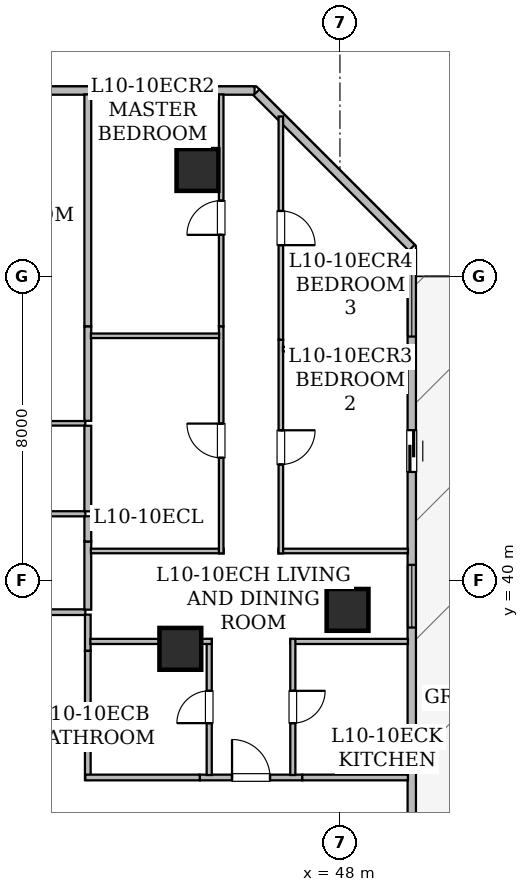
"""IFC4 building model, lengths in metres.
Left out: names, types, materials, properties, quantities, classifications, styles, units other than length and angle.
Written with IfcOpenShell. Run it as: python <this file> out.ifc"""

import sys

from ifc_helpers import new_model, si_unit, direction, frame, frame_2d, origin, origin_2d, place, context, subcontext, project, spatial, rectangle, hollow_rectangle, extrude, element, fill, save


model = new_model("IFC4")
c1 = context("Model", 3, precision=1e-05, world=origin(), true_north=direction((0.0, 1.0)))
c2 = subcontext(c1, "Body", "Model", "MODEL_VIEW")
j1 = project(units=[si_unit("LENGTHUNIT", "METRE"), si_unit("PLANEANGLEUNIT", "RADIAN")], contexts=[c1])
p1 = place(None, origin())
s1 = spatial("IfcSite", under=j1, at=p1, CompositionType="ELEMENT")
p2 = place(p1, origin())
s2 = spatial("IfcBuilding", under=s1, at=p2, CompositionType="ELEMENT")
p3 = place(p2, frame((0.0, 0.0, 44.25)))
s3 = spatial("IfcBuildingStorey", under=s2, at=p3, CompositionType="ELEMENT", Elevation=44.25)
for number, where, z_axis, x_axis in (
    (1, (44.25, 50.8, 0.0), (0.0, 0.0, 1.0), (1.0, 0.0, 0.0)),
    (2, (48.2, 39.225, 0.0), (0.0, 0.0, 1.0), (1.0, 0.0, 0.0)),
    (3, (43.8, 38.2, 0.0), (0.0, 0.0, 1.0), (1.0, 0.0, 0.0)),
):
    element("IfcColumn", number, at=place(p3, frame(where, z_axis=z_axis, x_axis=x_axis)), inside=s3, PredefinedType="COLUMN", context=c2, shape_type="SweptSolid", body=[
        extrude(hollow_rectangle(XDim=1.1, YDim=1.1, WallThickness=0.055, at=origin_2d()), origin(), (0.0, 0.0, 1.0), 3.65),
    ])
p4 = place(p3, frame((8.315, 52.89, 0.0), z_axis=(0.0, 0.0, 1.0), x_axis=(1.0, 0.0, 0.0)))
e4 = element("IfcWall", 4, at=p4, inside=s3, PredefinedType="STANDARD", context=c2, shape_type="SweptSolid", body=[
    extrude(rectangle(XDim=37.439, YDim=0.22, at=frame_2d((18.719, 0.0))), origin(), (0.0, 0.0, 1.0), 3.43),
])
p5 = place(p4, frame((3.164, 0.0, 0.85)))
e5 = element("IfcOpeningElement", 5, at=p5, cuts=e4, PredefinedType="OPENING", context=c2, shape_type="SweptSolid", body=[
    extrude(rectangle(XDim=1.65, YDim=1.55, at=frame_2d((0.825, 0.775))), frame((0.0, 0.12, 0.0), z_axis=(0.0, -1.0, 0.0), x_axis=(1.0, 0.0, 0.0)), (0.0, 0.0, 1.0), 0.24),
])
p6 = place(p4, frame((15.94, 0.0, 0.85)))
e6 = element("IfcOpeningElement", 6, at=p6, cuts=e4, PredefinedType="OPENING", context=c2, shape_type="SweptSolid", body=[
    extrude(rectangle(XDim=1.65, YDim=1.55, at=frame_2d((0.825, 0.775))), frame((0.0, 0.12, 0.0), z_axis=(0.0, -1.0, 0.0), x_axis=(1.0, 0.0, 0.0)), (0.0, 0.0, 1.0), 0.24),
])
p7 = place(p4, frame((13.619, 0.0, 0.8)))
e7 = element("IfcOpeningElement", 7, at=p7, cuts=e4, PredefinedType="OPENING", context=c2, shape_type="SweptSolid", body=[
    extrude(rectangle(XDim=1.2, YDim=1.5, at=frame_2d((0.6, 0.75))), frame((0.0, 0.12, 0.0), z_axis=(0.0, -1.0, 0.0), x_axis=(1.0, 0.0, 0.0)), (0.0, 0.0, 1.0), 0.24),
])
p8 = place(p4, frame((8.999, 0.0, 0.85)))
e8 = element("IfcOpeningElement", 8, at=p8, cuts=e4, PredefinedType="OPENING", context=c2, shape_type="SweptSolid", body=[
    extrude(rectangle(XDim=1.65, YDim=1.55, at=frame_2d((0.825, 0.775))), frame((0.0, 0.12, 0.0), z_axis=(0.0, -1.0, 0.0), x_axis=(1.0, 0.0, 0.0)), (0.0, 0.0, 1.0), 0.24),
])
p9 = place(p4, frame((25.185, 0.0, 0.8)))
e9 = element("IfcOpeningElement", 9, at=p9, cuts=e4, PredefinedType="OPENING", context=c2, shape_type="SweptSolid", body=[
    extrude(rectangle(XDim=1.2, YDim=1.5, at=frame_2d((0.6, 0.75))), frame((0.0, 0.12, 0.0), z_axis=(0.0, -1.0, 0.0), x_axis=(1.0, 0.0, 0.0)), (0.0, 0.0, 1.0), 0.24),
])
p10 = place(p4, frame((20.935, 0.0, 0.85)))
e10 = element("IfcOpeningElement", 10, at=p10, cuts=e4, PredefinedType="OPENING", context=c2, shape_type="SweptSolid", body=[
    extrude(rectangle(XDim=1.65, YDim=1.55, at=frame_2d((0.825, 0.775))), frame((0.0, 0.12, 0.0), z_axis=(0.0, -1.0, 0.0), x_axis=(1.0, 0.0, 0.0)), (0.0, 0.0, 1.0), 0.24),
])
p11 = place(p4, frame((28.985, 0.0, 0.85)))
e11 = element("IfcOpeningElement", 11, at=p11, cuts=e4, PredefinedType="OPENING", context=c2, shape_type="SweptSolid", body=[
    extrude(rectangle(XDim=1.65, YDim=1.55, at=frame_2d((0.825, 0.775))), frame((0.0, 0.12, 0.0), z_axis=(0.0, -1.0, 0.0), x_axis=(1.0, 0.0, 0.0)), (0.0, 0.0, 1.0), 0.24),
])
p12 = place(p4, frame((33.98, 0.0, 0.85)))
e12 = element("IfcOpeningElement", 12, at=p12, cuts=e4, PredefinedType="OPENING", context=c2, shape_type="SweptSolid", body=[
    extrude(rectangle(XDim=1.65, YDim=1.55, at=frame_2d((0.825, 0.775))), frame((0.0, 0.12, 0.0), z_axis=(0.0, -1.0, 0.0), x_axis=(1.0, 0.0, 0.0)), (0.0, 0.0, 1.0), 0.24),
])
p13 = place(p3, frame((45.802, 52.842, 0.0), z_axis=(0.0, 0.0, 1.0), x_axis=(0.707085666273, -0.70712789547, 0.0)))
e13 = element("IfcWall", 13, at=p13, inside=s3, PredefinedType="STANDARD", context=c2, shape_type="SweptSolid", body=[
    extrude(rectangle(XDim=5.781, YDim=0.22, at=frame_2d((2.891, 0.0))), origin(), (0.0, 0.0, 1.0), 3.43),
])
p14 = place(p3, frame((49.89, 48.683, 0.0), z_axis=(0.0, 0.0, 1.0), x_axis=(0.0, -1.0, 0.0)))
e14 = element("IfcWall", 14, at=p14, inside=s3, PredefinedType="STANDARD", context=c2, shape_type="SweptSolid", body=[
    extrude(rectangle(XDim=17.446, YDim=0.22, at=frame_2d((8.723, 0.0))), origin(), (0.0, 0.0, 1.0), 3.43),
])
p15 = place(p14, frame((4.729, 0.0, 0.0)))
e15 = element("IfcOpeningElement", 15, at=p15, cuts=e14, PredefinedType="OPENING", context=c2, shape_type="SweptSolid", body=[
    extrude(rectangle(XDim=1.1, YDim=2.2, at=frame_2d((0.55, 1.1))), frame((0.0, 0.12, 0.0), z_axis=(0.0, -1.0, 0.0), x_axis=(1.0, 0.0, 0.0)), (0.0, 0.0, 1.0), 0.24),
])
p16 = place(p14, frame((8.273, 0.0, 0.85)))
e16 = element("IfcOpeningElement", 16, at=p16, cuts=e14, PredefinedType="OPENING", context=c2, shape_type="SweptSolid", body=[
    extrude(rectangle(XDim=1.65, YDim=1.55, at=frame_2d((0.825, 0.775))), frame((0.0, 0.12, 0.0), z_axis=(0.0, -1.0, 0.0), x_axis=(1.0, 0.0, 0.0)), (0.0, 0.0, 1.0), 0.24),
])
p17 = place(p14, frame((0.616, 0.0, 0.85)))
e17 = element("IfcOpeningElement", 17, at=p17, cuts=e14, PredefinedType="OPENING", context=c2, shape_type="SweptSolid", body=[
    extrude(rectangle(XDim=1.65, YDim=1.55, at=frame_2d((0.825, 0.775))), frame((0.0, 0.12, 0.0), z_axis=(0.0, -1.0, 0.0), x_axis=(1.0, 0.0, 0.0)), (0.0, 0.0, 1.0), 0.24),
])
p18 = place(p3, frame((34.299, 39.165, 0.0), z_axis=(0.0, 0.0, 1.0), x_axis=(1.0, 0.0, 0.0)))
e18 = element("IfcWall", 18, at=p18, inside=s3, PredefinedType="STANDARD", context=c2, shape_type="SweptSolid", body=[
    extrude(rectangle(XDim=7.001, YDim=0.15, at=frame_2d((3.5, 0.0))), origin(), (0.0, 0.0, 1.0), 3.43),
])
p19 = place(p3, frame((41.365, 39.1, 0.0), z_axis=(0.0, 0.0, 1.0), x_axis=(0.0, -1.0, 0.0)))
e19 = element("IfcWall", 19, at=p19, inside=s3, PredefinedType="STANDARD", context=c2, shape_type="SweptSolid", body=[
    extrude(rectangle(XDim=0.954, YDim=0.15, at=frame_2d((0.477, 0.0))), origin(), (0.0, 0.0, 1.0), 3.43),
])
p20 = place(p3, frame((44.311, 34.815, 0.0), z_axis=(0.0, 0.0, 1.0), x_axis=(1.0, 0.0, 0.0)))
e20 = element("IfcWall", 20, at=p20, inside=s3, PredefinedType="STANDARD", context=c2, shape_type="SweptSolid", body=[
    extrude(rectangle(XDim=2.698, YDim=0.15, at=frame_2d((1.349, 0.0))), origin(), (0.0, 0.0, 1.0), 3.43),
])
p21 = place(p20, frame((0.849, 0.0, 0.0)))
e21 = element("IfcOpeningElement", 21, at=p21, cuts=e20, PredefinedType="OPENING", context=c2, shape_type="SweptSolid", body=[
    extrude(rectangle(XDim=1.0, YDim=2.15, at=frame_2d((0.5, 1.075))), frame((0.0, 0.085, 0.0), z_axis=(0.0, -1.0, 0.0), x_axis=(1.0, 0.0, 0.0)), (0.0, 0.0, 1.0), 0.17),
])
p22 = place(p3, frame((41.365, 38.146, 0.0), z_axis=(0.0, 0.0, 1.0), x_axis=(0.0, -1.0, 0.0)))
e22 = element("IfcWall", 22, at=p22, inside=s3, PredefinedType="STANDARD", context=c2, shape_type="SweptSolid", body=[
    extrude(rectangle(XDim=3.396, YDim=0.15, at=frame_2d((1.698, 0.0))), origin(), (0.0, 0.0, 1.0), 2.647),
])
p23 = place(p3, frame((41.3, 34.815, 0.0), z_axis=(0.0, 0.0, 1.0), x_axis=(1.0, 0.0, 0.0)))
e23 = element("IfcWall", 23, at=p23, inside=s3, PredefinedType="STANDARD", context=c2, shape_type="SweptSolid", body=[
    extrude(rectangle(XDim=3.011, YDim=0.15, at=frame_2d((1.505, 0.0))), origin(), (0.0, 0.0, 1.0), 2.647),
])
p24 = place(p3, frame((47.009, 34.815, 0.0), z_axis=(0.0, 0.0, 1.0), x_axis=(1.0, 0.0, 0.0)))
e24 = element("IfcWall", 24, at=p24, inside=s3, PredefinedType="STANDARD", context=c2, shape_type="SweptSolid", body=[
    extrude(rectangle(XDim=2.779, YDim=0.15, at=frame_2d((1.39, 0.0))), origin(), (0.0, 0.0, 1.0), 2.803),
])
p25 = place(p3, frame((41.3, 41.754, 0.0), z_axis=(0.0, 0.0, 1.0), x_axis=(-1.0, 0.0, 0.0)))
e25 = element("IfcWall", 25, at=p25, inside=s3, PredefinedType="PARTITIONING", context=c2, shape_type="SweptSolid", body=[
    extrude(rectangle(XDim=7.315, YDim=0.135, at=frame_2d((3.657, 0.0))), origin(), (0.0, 0.0, 1.0), 3.43),
])
p26 = place(p25, frame((3.233, 0.0, 0.0)))
e26 = element("IfcOpeningElement", 26, at=p26, cuts=e25, PredefinedType="OPENING", context=c2, shape_type="SweptSolid", body=[
    extrude(rectangle(XDim=0.85, YDim=2.1, at=frame_2d((0.425, 1.05))), frame((0.0, 0.077, 0.0), z_axis=(0.0, -1.0, 0.0), x_axis=(1.0, 0.0, 0.0)), (0.0, 0.0, 1.0), 0.155),
])
p27 = place(p3, frame((34.82, 44.134, 0.0), z_axis=(0.0, 0.0, 1.0), x_axis=(1.0, 0.0, 0.0)))
e27 = element("IfcWall", 27, at=p27, inside=s3, PredefinedType="PARTITIONING", context=c2, shape_type="SweptSolid", body=[
    extrude(rectangle(XDim=6.48, YDim=0.12, at=frame_2d((3.24, 0.0))), origin(), (0.0, 0.0, 1.0), 3.43),
])
p28 = place(p3, frame((41.365, 44.069, 0.0), z_axis=(0.0, 0.0, 1.0), x_axis=(0.0, -1.0, 0.0)))
e28 = element("IfcWall", 28, at=p28, inside=s3, PredefinedType="STANDARD", context=c2, shape_type="SweptSolid", body=[
    extrude(rectangle(XDim=2.25, YDim=0.18, at=frame_2d((1.125, 0.0))), origin(), (0.0, 0.0, 1.0), 2.957),
])
p29 = place(p3, frame((41.365, 41.024, 0.0), z_axis=(0.0, 0.0, 1.0), x_axis=(0.0, -1.0, 0.0)))
e29 = element("IfcWall", 29, at=p29, inside=s3, PredefinedType="STANDARD", context=c2, shape_type="SweptSolid", body=[
    extrude(rectangle(XDim=1.794, YDim=0.18, at=frame_2d((0.897, 0.0))), origin(), (0.0, 0.0, 1.0), 3.43),
])
p30 = place(p3, frame((41.365, 41.689, 0.0), z_axis=(0.0, 0.0, 1.0), x_axis=(0.0, -1.0, 0.0)))
e30 = element("IfcWall", 30, at=p30, inside=s3, PredefinedType="STANDARD", context=c2, shape_type="SweptSolid", body=[
    extrude(rectangle(XDim=0.665, YDim=0.18, at=frame_2d((0.333, 0.0))), origin(), (0.0, 0.0, 1.0), 3.43),
])
p31 = place(p3, frame((41.365, 46.687, 0.0), z_axis=(0.0, 0.0, 1.0), x_axis=(0.0, -1.0, 0.0)))
e31 = element("IfcWall", 31, at=p31, inside=s3, PredefinedType="STANDARD", context=c2, shape_type="SweptSolid", body=[
    extrude(rectangle(XDim=2.488, YDim=0.18, at=frame_2d((1.244, 0.0))), origin(), (0.0, 0.0, 1.0), 3.43),
])
p32 = place(p3, frame((41.365, 52.788, 0.0), z_axis=(0.0, 0.0, 1.0), x_axis=(0.0, -1.0, 0.0)))
e32 = element("IfcWall", 32, at=p32, inside=s3, PredefinedType="STANDARD", context=c2, shape_type="SweptSolid", body=[
    extrude(rectangle(XDim=6.101, YDim=0.18, at=frame_2d((3.051, 0.0))), origin(), (0.0, 0.0, 1.0), 2.803),
])
p33 = place(p3, frame((44.56, 34.88, 0.0), z_axis=(0.0, 0.0, 1.0), x_axis=(0.0, 1.0, 0.0)))
e33 = element("IfcWall", 33, at=p33, inside=s3, PredefinedType="PARTITIONING", context=c2, shape_type="SweptSolid", body=[
    extrude(rectangle(XDim=3.58, YDim=0.135, at=frame_2d((1.79, 0.0))), origin(), (0.0, 0.0, 1.0), 2.647),
])
p34 = place(p33, frame((1.365, 0.0, 0.0)))
e34 = element("IfcOpeningElement", 34, at=p34, cuts=e33, PredefinedType="OPENING", context=c2, shape_type="SweptSolid", body=[
    extrude(rectangle(XDim=0.85, YDim=2.1, at=frame_2d((0.425, 1.05))), frame((0.0, 0.077, 0.0), z_axis=(0.0, -1.0, 0.0), x_axis=(1.0, 0.0, 0.0)), (0.0, 0.0, 1.0), 0.155),
])
p35 = place(p3, frame((44.625, 38.395, 0.0), z_axis=(0.0, 0.0, 1.0), x_axis=(-1.0, 0.0, 0.0)))
e35 = element("IfcWall", 35, at=p35, inside=s3, PredefinedType="PARTITIONING", context=c2, shape_type="SweptSolid", body=[
    extrude(rectangle(XDim=3.193, YDim=0.135, at=frame_2d((1.597, 0.0))), origin(), (0.0, 0.0, 1.0), 2.647),
])
p36 = place(p3, frame((49.788, 38.395, 0.0), z_axis=(0.0, 0.0, 1.0), x_axis=(-1.0, 0.0, 0.0)))
e36 = element("IfcWall", 36, at=p36, inside=s3, PredefinedType="PARTITIONING", context=c2, shape_type="SweptSolid", body=[
    extrude(rectangle(XDim=3.093, YDim=0.135, at=frame_2d((1.546, 0.0))), origin(), (0.0, 0.0, 1.0), 2.803),
])
p37 = place(p3, frame((46.76, 38.46, 0.0), z_axis=(0.0, 0.0, 1.0), x_axis=(0.0, -1.0, 0.0)))
e37 = element("IfcWall", 37, at=p37, inside=s3, PredefinedType="PARTITIONING", context=c2, shape_type="SweptSolid", body=[
    extrude(rectangle(XDim=3.58, YDim=0.135, at=frame_2d((1.79, 0.0))), origin(), (0.0, 0.0, 1.0), 3.43),
])
p38 = place(p37, frame((1.365, 0.0, 0.0)))
e38 = element("IfcOpeningElement", 38, at=p38, cuts=e37, PredefinedType="OPENING", context=c2, shape_type="SweptSolid", body=[
    extrude(rectangle(XDim=0.85, YDim=2.1, at=frame_2d((0.425, 1.05))), frame((0.0, 0.077, 0.0), z_axis=(0.0, -1.0, 0.0), x_axis=(1.0, 0.0, 0.0)), (0.0, 0.0, 1.0), 0.155),
])
p39 = place(p3, frame((41.447, 40.775, 0.0), z_axis=(0.0, 0.0, 1.0), x_axis=(1.0, 0.0, 0.0)))
e39 = element("IfcWall", 39, at=p39, inside=s3, PredefinedType="PARTITIONING", context=c2, shape_type="SweptSolid", body=[
    extrude(rectangle(XDim=3.493, YDim=0.12, at=frame_2d((1.747, 0.0))), origin(), (0.0, 0.0, 1.0), 2.647),
])
p40 = place(p3, frame((44.875, 40.71, 0.0), z_axis=(0.0, 0.0, 1.0), x_axis=(0.0, 1.0, 0.0)))
e40 = element("IfcWall", 40, at=p40, inside=s3, PredefinedType="PARTITIONING", context=c2, shape_type="SweptSolid", body=[
    extrude(rectangle(XDim=5.977, YDim=0.12, at=frame_2d((2.989, 0.0))), origin(), (0.0, 0.0, 1.0), 2.957),
])
p41 = place(p40, frame((2.517, 0.0, 0.0)))
e41 = element("IfcOpeningElement", 41, at=p41, cuts=e40, PredefinedType="OPENING", context=c2, shape_type="SweptSolid", body=[
    extrude(rectangle(XDim=0.9, YDim=2.1, at=frame_2d((0.45, 1.05))), frame((0.0, 0.07, 0.0), z_axis=(0.0, -1.0, 0.0), x_axis=(1.0, 0.0, 0.0)), (0.0, 0.0, 1.0), 0.14),
])
p42 = place(p3, frame((44.875, 46.687, 0.0), z_axis=(0.0, 0.0, 1.0), x_axis=(0.0, 1.0, 0.0)))
e42 = element("IfcWall", 42, at=p42, inside=s3, PredefinedType="PARTITIONING", context=c2, shape_type="SweptSolid", body=[
    extrude(rectangle(XDim=6.101, YDim=0.12, at=frame_2d((3.051, 0.0))), origin(), (0.0, 0.0, 1.0), 2.803),
])
p43 = place(p42, frame((2.406, 0.0, 0.0)))
e43 = element("IfcOpeningElement", 43, at=p43, cuts=e42, PredefinedType="OPENING", context=c2, shape_type="SweptSolid", body=[
    extrude(rectangle(XDim=0.9, YDim=2.1, at=frame_2d((0.45, 1.05))), frame((0.0, 0.07, 0.0), z_axis=(0.0, -1.0, 0.0), x_axis=(1.0, 0.0, 0.0)), (0.0, 0.0, 1.0), 0.14),
])
p44 = place(p3, frame((46.38, 40.775, 0.0), z_axis=(0.0, 0.0, 1.0), x_axis=(1.0, 0.0, 0.0)))
e44 = element("IfcWall", 44, at=p44, inside=s3, PredefinedType="PARTITIONING", context=c2, shape_type="SweptSolid", body=[
    extrude(rectangle(XDim=3.408, YDim=0.12, at=frame_2d((1.704, 0.0))), origin(), (0.0, 0.0, 1.0), 2.803),
])
p45 = place(p3, frame((46.445, 46.336, 0.0), z_axis=(0.0, 0.0, 1.0), x_axis=(0.0, -1.0, 0.0)))
e45 = element("IfcWall", 45, at=p45, inside=s3, PredefinedType="PARTITIONING", context=c2, shape_type="SweptSolid", body=[
    extrude(rectangle(XDim=5.626, YDim=0.12, at=frame_2d((2.813, 0.0))), origin(), (0.0, 0.0, 1.0), 2.803),
])
p46 = place(p45, frame((2.385, 0.0, 0.0)))
e46 = element("IfcOpeningElement", 46, at=p46, cuts=e45, PredefinedType="OPENING", context=c2, shape_type="SweptSolid", body=[
    extrude(rectangle(XDim=0.9, YDim=2.1, at=frame_2d((0.45, 1.05))), frame((0.0, 0.07, 0.0), z_axis=(0.0, -1.0, 0.0), x_axis=(1.0, 0.0, 0.0)), (0.0, 0.0, 1.0), 0.14),
])
p47 = place(p3, frame((46.445, 52.208, 0.0), z_axis=(0.0, 0.0, 1.0), x_axis=(0.0, -1.0, 0.0)))
e47 = element("IfcWall", 47, at=p47, inside=s3, PredefinedType="PARTITIONING", context=c2, shape_type="SweptSolid", body=[
    extrude(rectangle(XDim=5.872, YDim=0.12, at=frame_2d((2.936, 0.0))), origin(), (0.0, 0.0, 1.0), 3.43),
])
p48 = place(p47, frame((2.486, 0.0, 0.0)))
e48 = element("IfcOpeningElement", 48, at=p48, cuts=e47, PredefinedType="OPENING", context=c2, shape_type="SweptSolid", body=[
    extrude(rectangle(XDim=0.9, YDim=2.1, at=frame_2d((0.45, 1.05))), frame((0.0, 0.07, 0.0), z_axis=(0.0, -1.0, 0.0), x_axis=(1.0, 0.0, 0.0)), (0.0, 0.0, 1.0), 0.14),
])
p49 = place(p3, frame((41.447, 46.437, 0.0), z_axis=(0.0, 0.0, 1.0), x_axis=(1.0, 0.0, 0.0)))
e49 = element("IfcWall", 49, at=p49, inside=s3, PredefinedType="PARTITIONING", context=c2, shape_type="SweptSolid", body=[
    extrude(rectangle(XDim=3.374, YDim=0.12, at=frame_2d((1.687, 0.0))), origin(), (0.0, 0.0, 1.0), 2.647),
])
p50 = place(p3, frame((46.499, 46.086, 0.0), z_axis=(0.0, 0.0, 1.0), x_axis=(1.0, 0.0, 0.0)))
e50 = element("IfcWall", 50, at=p50, inside=s3, PredefinedType="PARTITIONING", context=c2, shape_type="SweptSolid", body=[
    extrude(rectangle(XDim=3.289, YDim=0.12, at=frame_2d((1.645, 0.0))), origin(), (0.0, 0.0, 1.0), 3.43),
])
p51 = place(p15, origin())
e51 = element("IfcDoor", 51, at=p51, inside=s3, OperationType="SLIDING_TO_LEFT", PredefinedType="DOOR", context=c2, shape_type="SweptSolid", body=[
    extrude(rectangle(XDim=1.1, YDim=2.2, at=frame_2d((0.55, 1.1))), frame((0.0, 0.025, 0.0), z_axis=(0.0, -1.0, 0.0), x_axis=(1.0, 0.0, 0.0)), (0.0, 0.0, 1.0), 0.05),
])
fill(e15, e51)
p52 = place(p16, origin())
e52 = element("IfcWindow", 52, at=p52, inside=s3, PartitioningType="SINGLE_PANEL", PredefinedType="WINDOW", context=c2, shape_type="SweptSolid", body=[
    extrude(rectangle(XDim=1.65, YDim=1.55, at=frame_2d((0.825, 0.775))), frame((0.0, 0.03, 0.0), z_axis=(0.0, -1.0, 0.0), x_axis=(1.0, 0.0, 0.0)), (0.0, 0.0, 1.0), 0.06),
])
fill(e16, e52)
p53 = place(p12, origin())
e53 = element("IfcWindow", 53, at=p53, inside=s3, PartitioningType="SINGLE_PANEL", PredefinedType="WINDOW", context=c2, shape_type="SweptSolid", body=[
    extrude(rectangle(XDim=1.65, YDim=1.55, at=frame_2d((0.825, 0.775))), frame((0.0, 0.03, 0.0), z_axis=(0.0, -1.0, 0.0), x_axis=(1.0, 0.0, 0.0)), (0.0, 0.0, 1.0), 0.06),
])
fill(e12, e53)
p54 = place(p17, origin())
e54 = element("IfcWindow", 54, at=p54, inside=s3, PartitioningType="SINGLE_PANEL", PredefinedType="WINDOW", context=c2, shape_type="SweptSolid", body=[
    extrude(rectangle(XDim=1.65, YDim=1.55, at=frame_2d((0.825, 0.775))), frame((0.0, 0.03, 0.0), z_axis=(0.0, -1.0, 0.0), x_axis=(1.0, 0.0, 0.0)), (0.0, 0.0, 1.0), 0.06),
])
fill(e17, e54)
p55 = place(p21, origin())
e55 = element("IfcDoor", 55, at=p55, inside=s3, OperationType="SINGLE_SWING_LEFT", PredefinedType="DOOR", context=c2, shape_type="SweptSolid", body=[
    extrude(rectangle(XDim=1.0, YDim=2.15, at=frame_2d((0.5, 1.075))), frame((0.0, 0.025, 0.0), z_axis=(0.0, -1.0, 0.0), x_axis=(1.0, 0.0, 0.0)), (0.0, 0.0, 1.0), 0.05),
])
fill(e21, e55)
p56 = place(p34, origin())
e56 = element("IfcDoor", 56, at=p56, inside=s3, OperationType="SINGLE_SWING_LEFT", PredefinedType="DOOR", context=c2, shape_type="SweptSolid", body=[
    extrude(rectangle(XDim=0.85, YDim=2.1, at=frame_2d((0.425, 1.05))), frame((0.0, 0.025, 0.0), z_axis=(0.0, -1.0, 0.0), x_axis=(1.0, 0.0, 0.0)), (0.0, 0.0, 1.0), 0.05),
])
fill(e34, e56)
p57 = place(p38, origin())
e57 = element("IfcDoor", 57, at=p57, inside=s3, OperationType="SINGLE_SWING_LEFT", PredefinedType="DOOR", context=c2, shape_type="SweptSolid", body=[
    extrude(rectangle(XDim=0.85, YDim=2.1, at=frame_2d((0.425, 1.05))), frame((0.0, 0.025, 0.0), z_axis=(0.0, -1.0, 0.0), x_axis=(1.0, 0.0, 0.0)), (0.0, 0.0, 1.0), 0.05),
])
fill(e38, e57)
p58 = place(p41, origin())
e58 = element("IfcDoor", 58, at=p58, inside=s3, OperationType="SINGLE_SWING_RIGHT", PredefinedType="DOOR", context=c2, shape_type="SweptSolid", body=[
    extrude(rectangle(XDim=0.9, YDim=2.1, at=frame_2d((0.45, 1.05))), frame((0.0, 0.025, 0.0), z_axis=(0.0, -1.0, 0.0), x_axis=(1.0, 0.0, 0.0)), (0.0, 0.0, 1.0), 0.05),
])
fill(e41, e58)
p59 = place(p43, origin())
e59 = element("IfcDoor", 59, at=p59, inside=s3, OperationType="SINGLE_SWING_LEFT", PredefinedType="DOOR", context=c2, shape_type="SweptSolid", body=[
    extrude(rectangle(XDim=0.9, YDim=2.1, at=frame_2d((0.45, 1.05))), frame((0.0, 0.025, 0.0), z_axis=(0.0, -1.0, 0.0), x_axis=(1.0, 0.0, 0.0)), (0.0, 0.0, 1.0), 0.05),
])
fill(e43, e59)
p60 = place(p46, origin())
e60 = element("IfcDoor", 60, at=p60, inside=s3, OperationType="SINGLE_SWING_LEFT", PredefinedType="DOOR", context=c2, shape_type="SweptSolid", body=[
    extrude(rectangle(XDim=0.9, YDim=2.1, at=frame_2d((0.45, 1.05))), frame((0.0, 0.025, 0.0), z_axis=(0.0, -1.0, 0.0), x_axis=(1.0, 0.0, 0.0)), (0.0, 0.0, 1.0), 0.05),
])
fill(e46, e60)
p61 = place(p48, origin())
e61 = element("IfcDoor", 61, at=p61, inside=s3, OperationType="SINGLE_SWING_RIGHT", PredefinedType="DOOR", context=c2, shape_type="SweptSolid", body=[
    extrude(rectangle(XDim=0.9, YDim=2.1, at=frame_2d((0.45, 1.05))), frame((0.0, 0.025, 0.0), z_axis=(0.0, -1.0, 0.0), x_axis=(1.0, 0.0, 0.0)), (0.0, 0.0, 1.0), 0.05),
])
fill(e48, e61)
save(model, sys.argv[1])
